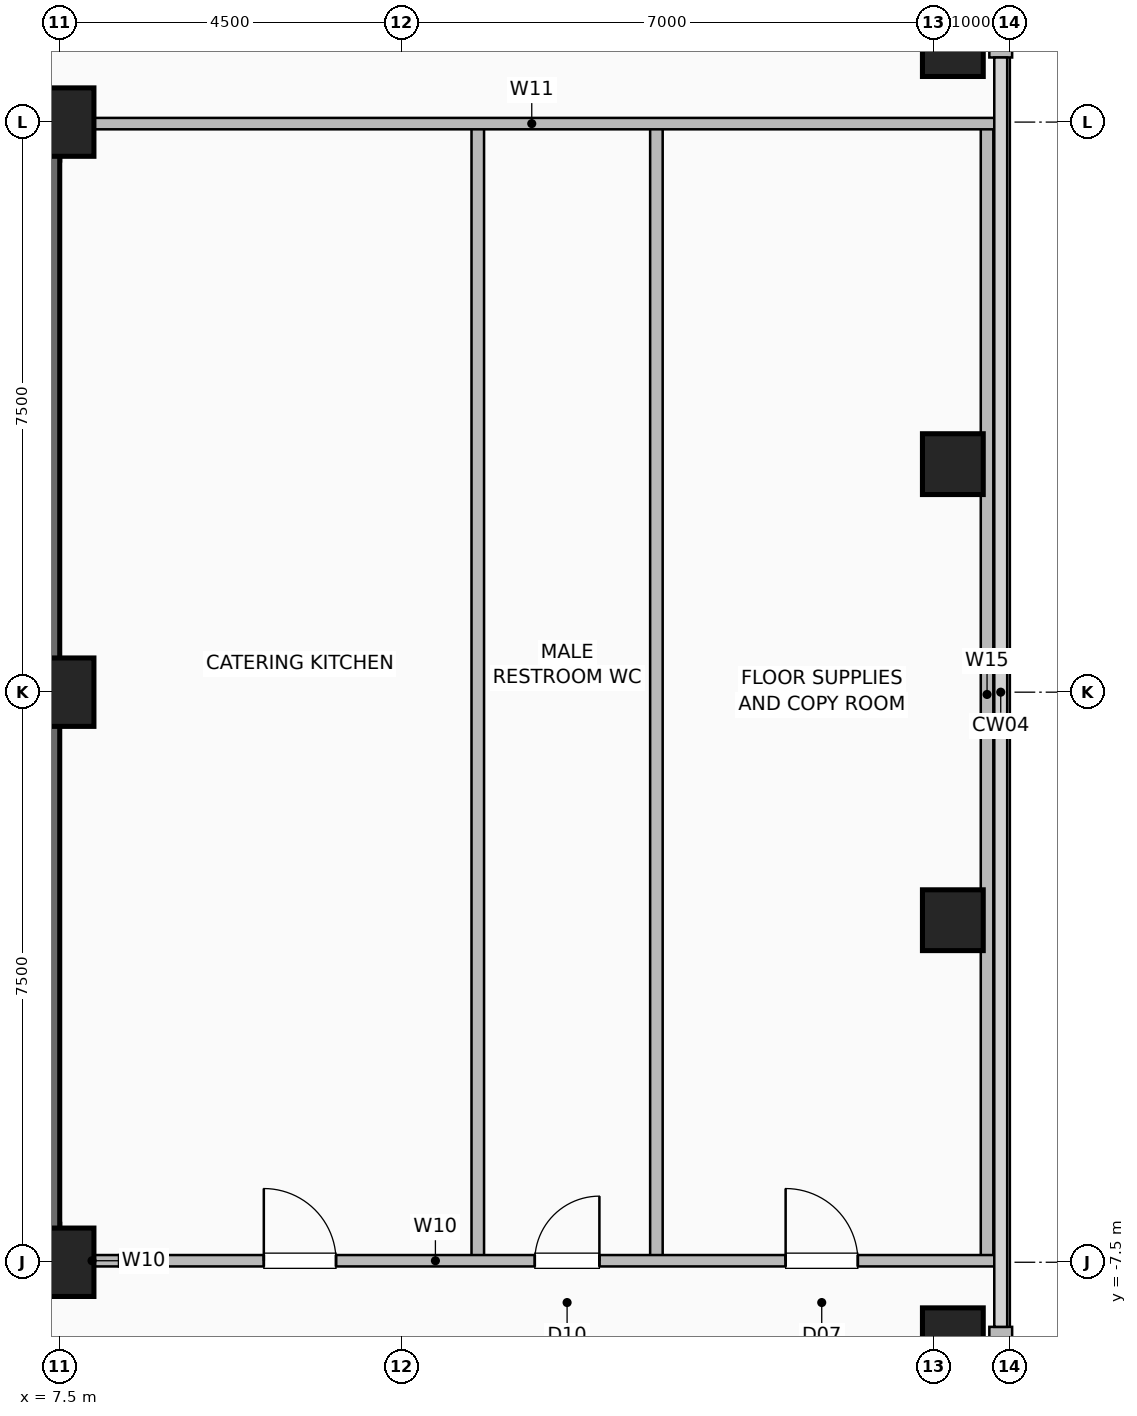
"""IFC4 building model, lengths in metres.
Left out: names, types, materials, properties, quantities, classifications, styles, units other than length and angle.
Written with IfcOpenShell. Run it as: python <this file> out.ifc"""

import sys

from ifc_helpers import new_model, si_unit, direction, frame, frame_2d, origin, origin_2d, place, context, subcontext, project, spatial, rectangle, hollow_rectangle, extrude, element, fill, save


model = new_model("IFC4")
c1 = context("Model", 3, precision=1e-05, world=origin(), true_north=direction((0.0, 1.0)))
c2 = subcontext(c1, "Body", "Model", "MODEL_VIEW")
j1 = project(units=[si_unit("LENGTHUNIT", "METRE"), si_unit("PLANEANGLEUNIT", "RADIAN")], contexts=[c1])
p1 = place(None, origin())
s1 = spatial("IfcSite", under=j1, at=p1, CompositionType="ELEMENT")
p2 = place(p1, origin())
s2 = spatial("IfcBuilding", under=s1, at=p2, CompositionType="ELEMENT")
p3 = place(p2, frame((0.0, 0.0, 223.8)))
s3 = spatial("IfcBuildingStorey", under=s2, at=p3, CompositionType="ELEMENT", Elevation=223.8)
for number, where, z_axis, x_axis in (
    (1, (7.5, -7.5, 0.0), (0.0, 0.0, 1.0), (1.0, 0.0, 0.0)),
    (2, (7.5, 0.0, 0.0), (0.0, 0.0, 1.0), (1.0, 0.0, 0.0)),
    (3, (7.5, 7.5, 0.0), (0.0, 0.0, 1.0), (1.0, 0.0, 0.0)),
):
    element("IfcColumn", number, at=place(p3, frame(where, z_axis=z_axis, x_axis=x_axis)), inside=s3, PredefinedType="COLUMN", context=c2, shape_type="SweptSolid", body=[
        extrude(hollow_rectangle(XDim=0.9, YDim=0.9, WallThickness=0.045, at=origin_2d()), origin(), (0.0, 0.0, 1.0), 3.6),
    ])
for number, where, z_axis, x_axis in (
    (4, (19.25, -8.5, 0.0), (0.0, 0.0, 1.0), (1.0, 0.0, 0.0)),
    (5, (19.25, -3.0, 0.0), (0.0, 0.0, 1.0), (1.0, 0.0, 0.0)),
    (6, (19.25, 3.0, 0.0), (0.0, 0.0, 1.0), (1.0, 0.0, 0.0)),
    (7, (19.25, 8.5, 0.0), (0.0, 0.0, 1.0), (1.0, 0.0, 0.0)),
):
    element("IfcColumn", number, at=place(p3, frame(where, z_axis=z_axis, x_axis=x_axis)), inside=s3, PredefinedType="COLUMN", context=c2, shape_type="SweptSolid", body=[
        extrude(hollow_rectangle(XDim=0.8, YDim=0.8, WallThickness=0.04, at=origin_2d()), origin(), (0.0, 0.0, 1.0), 3.6),
    ])
for number, where, z_axis, x_axis in (
    (8, (19.88, -13.15, 0.0), (0.0, 0.0, 1.0), (0.0, 1.0, 0.0)),
    (9, (19.88, 8.35, 0.0), (0.0, 0.0, 1.0), (0.0, 1.0, 0.0)),
):
    element("IfcWall", number, at=place(p3, frame(where, z_axis=z_axis, x_axis=x_axis)), inside=s3, PredefinedType="SOLIDWALL", context=c2, shape_type="SweptSolid", body=[
        extrude(rectangle(XDim=4.8, YDim=0.3, at=frame_2d((2.4, 0.0))), origin(), (0.0, 0.0, 1.0), 3.25),
    ])
p4 = place(p3, frame((-7.5, -7.25, 0.0), z_axis=(0.0, 0.0, 1.0), x_axis=(1.0, 0.0, 0.0)))
e10 = element("IfcWall", 10, at=p4, inside=s3, PredefinedType="SHEAR", context=c2, shape_type="SweptSolid", body=[
    extrude(rectangle(XDim=15.0, YDim=0.5, at=frame_2d((7.5, 0.0))), origin(), (0.0, 0.0, 1.0), 3.25),
])
p5 = place(p4, frame((1.55, 0.0, 0.0)))
e11 = element("IfcOpeningElement", 11, at=p5, cuts=e10, PredefinedType="OPENING", context=c2, shape_type="SweptSolid", body=[
    extrude(rectangle(XDim=1.05, YDim=2.08, at=frame_2d((0.525, 1.04))), frame((0.0, 0.26, 0.0), z_axis=(0.0, -1.0, 0.0), x_axis=(1.0, 0.0, 0.0)), (0.0, 0.0, 1.0), 0.52),
])
p6 = place(p4, frame((12.4, 0.0, 0.0)))
e12 = element("IfcOpeningElement", 12, at=p6, cuts=e10, PredefinedType="OPENING", context=c2, shape_type="SweptSolid", body=[
    extrude(rectangle(XDim=1.05, YDim=2.08, at=frame_2d((0.525, 1.04))), frame((0.0, 0.26, 0.0), z_axis=(0.0, -1.0, 0.0), x_axis=(1.0, 0.0, 0.0)), (0.0, 0.0, 1.0), 0.52),
])
p7 = place(p4, frame((5.2, 0.0, 0.0)))
e13 = element("IfcOpeningElement", 13, at=p7, cuts=e10, PredefinedType="OPENING", context=c2, shape_type="SweptSolid", body=[
    extrude(rectangle(XDim=1.0, YDim=2.08, at=frame_2d((0.5, 1.04))), frame((0.0, 0.26, 0.0), z_axis=(0.0, -1.0, 0.0), x_axis=(1.0, 0.0, 0.0)), (0.0, 0.0, 1.0), 0.52),
])
p8 = place(p4, frame((8.65, 0.0, 0.0)))
e14 = element("IfcOpeningElement", 14, at=p8, cuts=e10, PredefinedType="OPENING", context=c2, shape_type="SweptSolid", body=[
    extrude(rectangle(XDim=1.0, YDim=2.08, at=frame_2d((0.5, 1.04))), frame((0.0, 0.26, 0.0), z_axis=(0.0, -1.0, 0.0), x_axis=(1.0, 0.0, 0.0)), (0.0, 0.0, 1.0), 0.52),
])
for number, where, z_axis, x_axis in (
    (15, (-7.5, 7.25, 0.0), (0.0, 0.0, 1.0), (1.0, 0.0, 0.0)),
    (16, (7.25, -7.5, 0.0), (0.0, 0.0, 1.0), (0.0, 1.0, 0.0)),
):
    element("IfcWall", number, at=place(p3, frame(where, z_axis=z_axis, x_axis=x_axis)), inside=s3, PredefinedType="SHEAR", context=c2, shape_type="SweptSolid", body=[
        extrude(rectangle(XDim=15.0, YDim=0.5, at=frame_2d((7.5, 0.0))), origin(), (0.0, 0.0, 1.0), 3.25),
    ])
p9 = place(p3, frame((7.45, -7.48, 0.0), z_axis=(0.0, 0.0, 1.0), x_axis=(1.0, 0.0, 0.0)))
e17 = element("IfcWall", 17, at=p9, inside=s3, PredefinedType="PARTITIONING", context=c2, shape_type="SweptSolid", body=[
    extrude(rectangle(XDim=0.95, YDim=0.15, at=frame_2d((0.475, 0.0))), origin(), (0.0, 0.0, 1.0), 3.25),
])
for number, where, z_axis, x_axis in (
    (18, (15.35, -7.48, 0.0), (0.0, 0.0, 1.0), (0.0, 1.0, 0.0)),
    (19, (13.0, -7.48, 0.0), (0.0, 0.0, 1.0), (0.0, 1.0, 0.0)),
    (20, (19.7, -7.48, 0.0), (0.0, 0.0, 1.0), (0.0, 1.0, 0.0)),
):
    element("IfcWall", number, at=place(p3, frame(where, z_axis=z_axis, x_axis=x_axis)), inside=s3, PredefinedType="PLUMBINGWALL", context=c2, shape_type="SweptSolid", body=[
        extrude(rectangle(XDim=14.9, YDim=0.165, at=frame_2d((7.45, 0.0))), origin(), (0.0, 0.0, 1.0), 3.25),
    ])
p10 = place(p3, frame((8.28, -7.48, 0.0), z_axis=(0.0, 0.0, 1.0), x_axis=(1.0, 0.0, 0.0)))
e21 = element("IfcWall", 21, at=p10, inside=s3, PredefinedType="PARTITIONING", context=c2, shape_type="SweptSolid", body=[
    extrude(rectangle(XDim=11.54, YDim=0.15, at=frame_2d((5.77, 0.0))), origin(), (0.0, 0.0, 1.0), 3.25),
])
p11 = place(p10, frame((1.905, 0.0, 0.0)))
e22 = element("IfcOpeningElement", 22, at=p11, cuts=e21, PredefinedType="OPENING", context=c2, shape_type="SweptSolid", body=[
    extrude(rectangle(XDim=0.95, YDim=2.06, at=frame_2d((0.475, 1.03))), frame((0.0, 0.085, 0.0), z_axis=(0.0, -1.0, 0.0), x_axis=(1.0, 0.0, 0.0)), (0.0, 0.0, 1.0), 0.17),
])
p12 = place(p10, frame((5.47, 0.0, 0.0)))
e23 = element("IfcOpeningElement", 23, at=p12, cuts=e21, PredefinedType="OPENING", context=c2, shape_type="SweptSolid", body=[
    extrude(rectangle(XDim=0.85, YDim=2.05, at=frame_2d((0.425, 1.025))), frame((0.0, 0.085, 0.0), z_axis=(0.0, -1.0, 0.0), x_axis=(1.0, 0.0, 0.0)), (0.0, 0.0, 1.0), 0.17),
])
p13 = place(p10, frame((8.77, 0.0, 0.0)))
e24 = element("IfcOpeningElement", 24, at=p13, cuts=e21, PredefinedType="OPENING", context=c2, shape_type="SweptSolid", body=[
    extrude(rectangle(XDim=0.95, YDim=2.06, at=frame_2d((0.475, 1.03))), frame((0.0, 0.085, 0.0), z_axis=(0.0, -1.0, 0.0), x_axis=(1.0, 0.0, 0.0)), (0.0, 0.0, 1.0), 0.17),
])
p14 = place(p3, frame((7.6, 7.48, 0.0), z_axis=(0.0, 0.0, 1.0), x_axis=(1.0, 0.0, 0.0)))
e25 = element("IfcWall", 25, at=p14, inside=s3, PredefinedType="PARTITIONING", context=c2, shape_type="SweptSolid", body=[
    extrude(rectangle(XDim=12.22, YDim=0.15, at=frame_2d((6.11, 0.0))), origin(), (0.0, 0.0, 1.0), 3.25),
])
p15 = place(p11, origin())
e26 = element("IfcDoor", 26, at=p15, inside=s3, OperationType="SINGLE_SWING_LEFT", PredefinedType="DOOR", context=c2, shape_type="SweptSolid", body=[
    extrude(rectangle(XDim=0.95, YDim=2.06, at=frame_2d((0.475, 1.03))), frame((0.0, 0.025, 0.0), z_axis=(0.0, -1.0, 0.0), x_axis=(1.0, 0.0, 0.0)), (0.0, 0.0, 1.0), 0.05),
])
fill(e22, e26)
p16 = place(p12, origin())
e27 = element("IfcDoor", 27, at=p16, inside=s3, OperationType="SINGLE_SWING_RIGHT", PredefinedType="DOOR", context=c2, shape_type="SweptSolid", body=[
    extrude(rectangle(XDim=0.85, YDim=2.05, at=frame_2d((0.425, 1.025))), frame((0.0, 0.025, 0.0), z_axis=(0.0, -1.0, 0.0), x_axis=(1.0, 0.0, 0.0)), (0.0, 0.0, 1.0), 0.05),
])
fill(e23, e27)
p17 = place(p13, origin())
e28 = element("IfcDoor", 28, at=p17, inside=s3, OperationType="SINGLE_SWING_LEFT", PredefinedType="DOOR", context=c2, shape_type="SweptSolid", body=[
    extrude(rectangle(XDim=0.95, YDim=2.06, at=frame_2d((0.475, 1.03))), frame((0.0, 0.025, 0.0), z_axis=(0.0, -1.0, 0.0), x_axis=(1.0, 0.0, 0.0)), (0.0, 0.0, 1.0), 0.05),
])
fill(e24, e28)
save(model, sys.argv[1])
